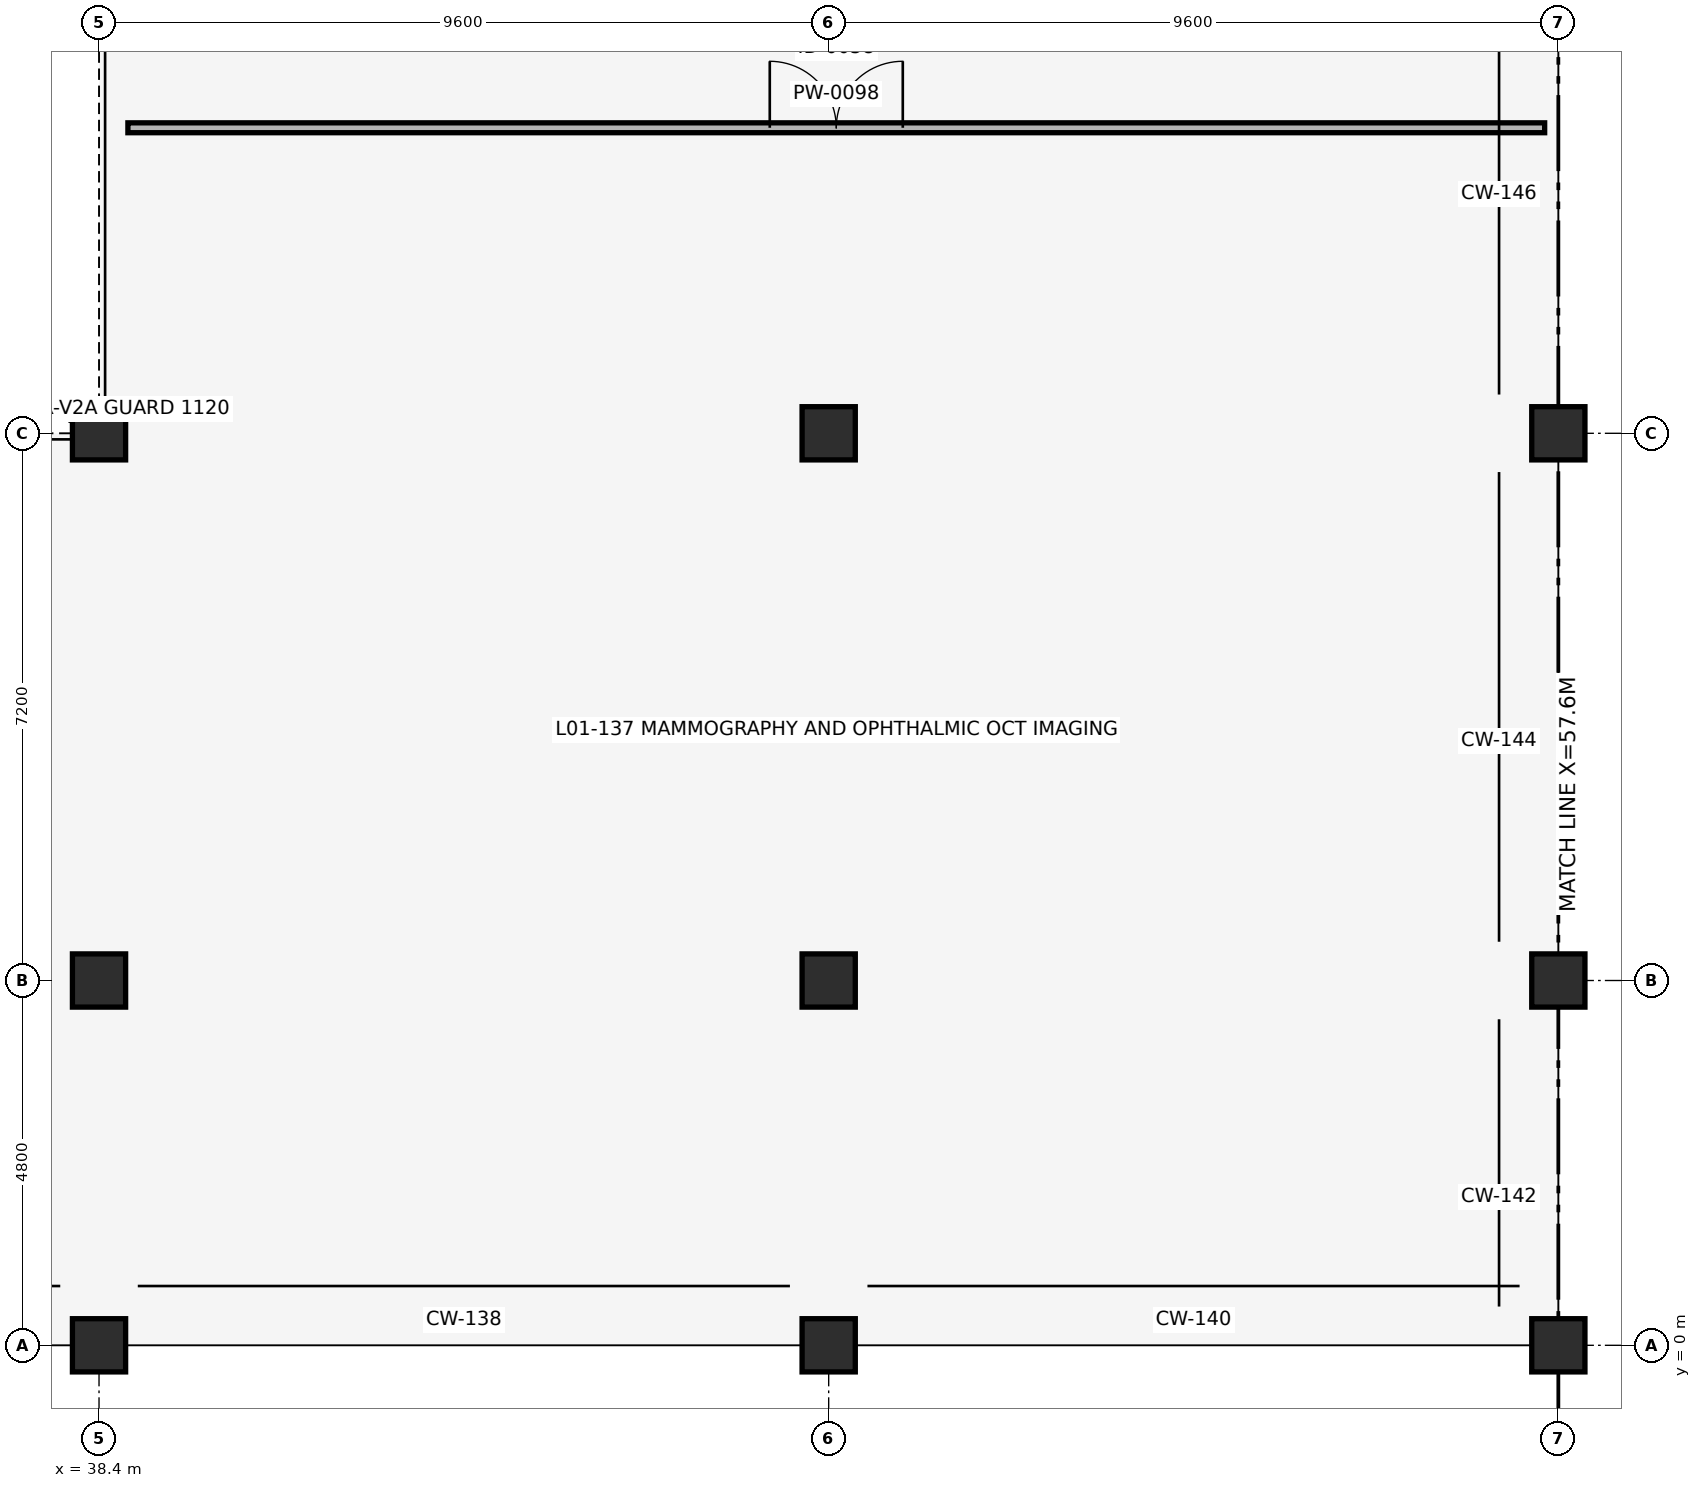
"""IFC4 building model, lengths in metres.
Left out: names, types, materials, properties, quantities, classifications, styles, units other than length and angle.
Written with IfcOpenShell. Run it as: python <this file> out.ifc"""

import sys

from ifc_helpers import new_model, si_unit, direction, frame, frame_2d, origin, origin_2d, place, context, subcontext, project, spatial, rectangle, circle, extrude, element, fill, save


model = new_model("IFC4")
c1 = context("Model", 3, precision=1e-05, world=origin(), true_north=direction((0.0, 1.0)))
c2 = subcontext(c1, "Body", "Model", "MODEL_VIEW")
j1 = project(units=[si_unit("LENGTHUNIT", "METRE"), si_unit("PLANEANGLEUNIT", "RADIAN")], contexts=[c1])
p1 = place(None, origin())
s1 = spatial("IfcSite", under=j1, at=p1, CompositionType="ELEMENT")
p2 = place(p1, origin())
s2 = spatial("IfcBuilding", under=s1, at=p2, CompositionType="ELEMENT")
p3 = place(p2, frame((0.0, 0.0, 4.42)))
s3 = spatial("IfcBuildingStorey", under=s2, at=p3, CompositionType="ELEMENT", Elevation=4.42)
for number, where, z_axis, x_axis in (
    (1, (38.4, 0.0, 0.0), (0.0, 0.0, 1.0), (1.0, 0.0, 0.0)),
    (2, (38.4, 4.8, 0.0), (0.0, 0.0, 1.0), (1.0, 0.0, 0.0)),
    (3, (38.4, 12.0, 0.0), (0.0, 0.0, 1.0), (1.0, 0.0, 0.0)),
    (4, (48.0, 0.0, 0.0), (0.0, 0.0, 1.0), (1.0, 0.0, 0.0)),
    (5, (48.0, 4.8, 0.0), (0.0, 0.0, 1.0), (1.0, 0.0, 0.0)),
    (6, (48.0, 12.0, 0.0), (0.0, 0.0, 1.0), (1.0, 0.0, 0.0)),
    (7, (57.6, 0.0, 0.0), (0.0, 0.0, 1.0), (1.0, 0.0, 0.0)),
    (8, (57.6, 4.8, 0.0), (0.0, 0.0, 1.0), (1.0, 0.0, 0.0)),
    (9, (57.6, 12.0, 0.0), (0.0, 0.0, 1.0), (1.0, 0.0, 0.0)),
):
    element("IfcColumn", number, at=place(p3, frame(where, z_axis=z_axis, x_axis=x_axis)), inside=s3, PredefinedType="COLUMN", context=c2, shape_type="SweptSolid", body=[
        extrude(circle(Radius=0.35, at=origin_2d()), origin(), (0.0, 0.0, 1.0), 4.08),
    ])
p4 = place(p3, frame((38.78, 16.02, 0.0), z_axis=(0.0, 0.0, 1.0), x_axis=(1.0, 0.0, 0.0)))
e10 = element("IfcWall", 10, at=p4, inside=s3, PredefinedType="PARTITIONING", context=c2, shape_type="SweptSolid", body=[
    extrude(rectangle(XDim=18.64, YDim=0.13, at=frame_2d((9.32, 0.0))), origin(), (0.0, 0.0, 1.0), 3.05),
])
p5 = place(p4, frame((8.445, 0.0, 0.0)))
e11 = element("IfcOpeningElement", 11, at=p5, cuts=e10, PredefinedType="OPENING", context=c2, shape_type="SweptSolid", body=[
    extrude(rectangle(XDim=1.75, YDim=2.15, at=frame_2d((0.875, 1.075))), frame((0.0, 0.075, 0.0), z_axis=(0.0, -1.0, 0.0), x_axis=(1.0, 0.0, 0.0)), (0.0, 0.0, 1.0), 0.15),
])
p6 = place(p5, origin())
e12 = element("IfcDoor", 12, at=p6, inside=s3, OperationType="DOUBLE_DOOR_SINGLE_SWING", PredefinedType="DOOR", context=c2, shape_type="SweptSolid", body=[
    extrude(rectangle(XDim=1.75, YDim=2.15, at=frame_2d((0.875, 1.075))), frame((0.0, 0.025, 0.0), z_axis=(0.0, -1.0, 0.0), x_axis=(1.0, 0.0, 0.0)), (0.0, 0.0, 1.0), 0.05),
])
fill(e11, e12)
save(model, sys.argv[1])
